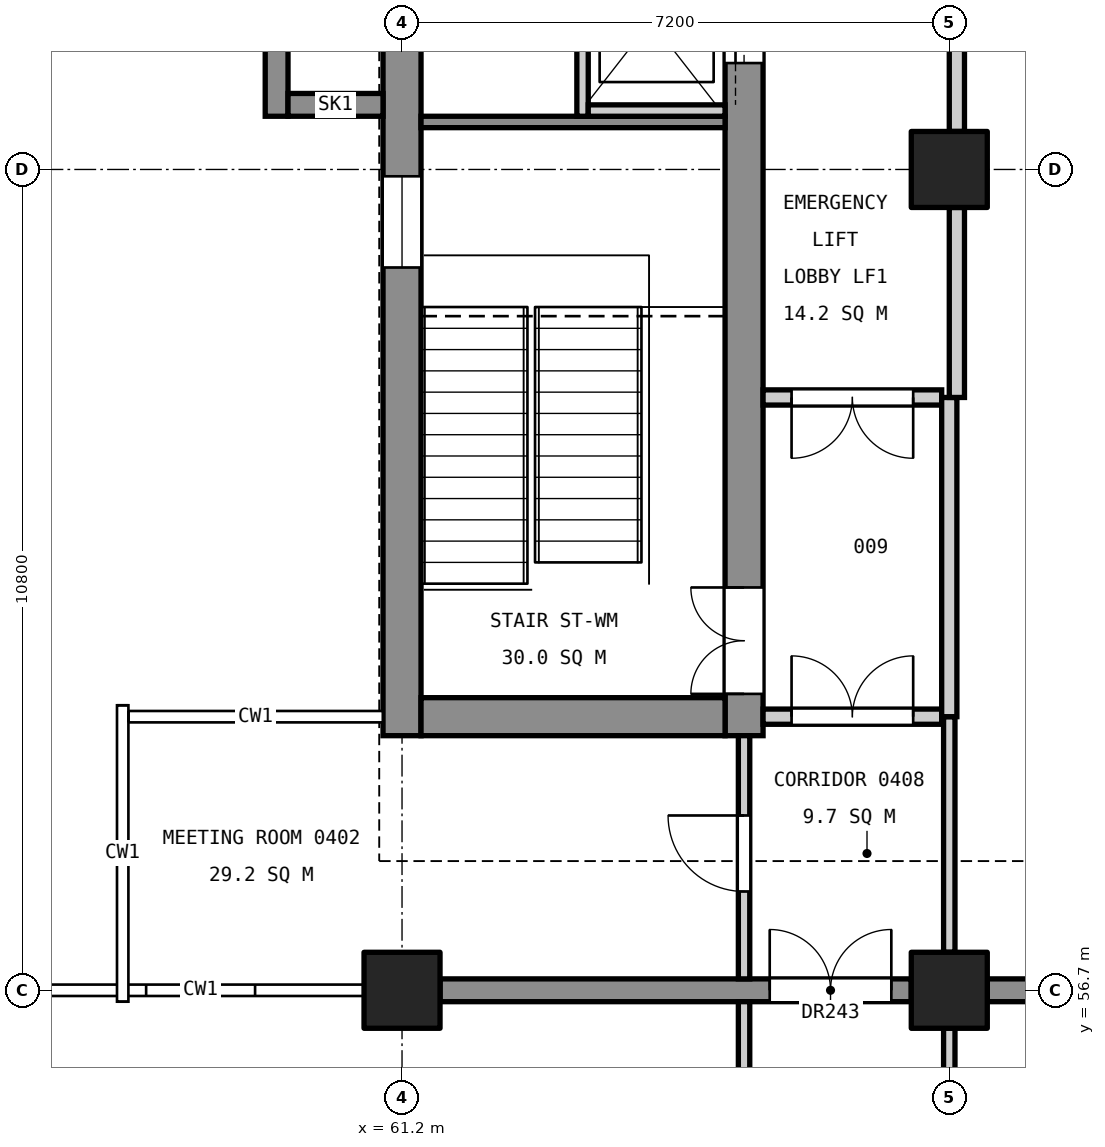
"""IFC4 building model, lengths in metres.
Left out: names, types, materials, properties, quantities, classifications, styles, units other than length and angle.
Written with IfcOpenShell. Run it as: python <this file> out.ifc"""

import sys

from ifc_helpers import new_model, si_unit, direction, frame, frame_2d, origin, origin_2d, place, context, subcontext, project, spatial, rectangle, extrude, element, fill, save


model = new_model("IFC4")
c1 = context("Model", 3, precision=1e-05, world=origin(), true_north=direction((0.0, 1.0)))
c2 = subcontext(c1, "Body", "Model", "MODEL_VIEW")
j1 = project(units=[si_unit("LENGTHUNIT", "METRE"), si_unit("PLANEANGLEUNIT", "RADIAN")], contexts=[c1])
p1 = place(None, origin())
s1 = spatial("IfcSite", under=j1, at=p1, CompositionType="ELEMENT")
p2 = place(p1, origin())
s2 = spatial("IfcBuilding", under=s1, at=p2, CompositionType="ELEMENT")
p3 = place(p2, frame((0.0, 0.0, 22.2)))
s3 = spatial("IfcBuildingStorey", under=s2, at=p3, CompositionType="ELEMENT", Elevation=22.2)
for number, where, z_axis, x_axis in (
    (1, (61.2, 56.7, 0.0), (0.0, 0.0, 1.0), (1.0, 0.0, 0.0)),
    (2, (68.4, 56.7, 0.0), (0.0, 0.0, 1.0), (1.0, 0.0, 0.0)),
    (3, (68.4, 67.5, 0.0), (0.0, 0.0, 1.0), (1.0, 0.0, 0.0)),
):
    element("IfcColumn", number, at=place(p3, frame(where, z_axis=z_axis, x_axis=x_axis)), inside=s3, PredefinedType="COLUMN", context=c2, shape_type="SweptSolid", body=[
        extrude(rectangle(XDim=1.0, YDim=1.0, at=origin_2d()), origin(), (0.0, 0.0, 1.0), 4.8),
    ])
p4 = place(p3, frame((61.2, 60.05, 0.0), z_axis=(0.0, 0.0, 1.0), x_axis=(0.0, 1.0, 0.0)))
e4 = element("IfcWall", 4, at=p4, inside=s3, PredefinedType="SHEAR", context=c2, shape_type="SweptSolid", body=[
    extrude(rectangle(XDim=14.9, YDim=0.5, at=frame_2d((7.45, 0.0))), origin(), (0.0, 0.0, 1.0), 4.55),
])
p5 = place(p4, frame((6.16, 0.0, 3.4)))
e5 = element("IfcOpeningElement", 5, at=p5, cuts=e4, PredefinedType="OPENING", context=c2, shape_type="SweptSolid", body=[
    extrude(rectangle(XDim=1.2, YDim=0.9, at=frame_2d((0.6, 0.45))), frame((0.0, 0.26, 0.0), z_axis=(0.0, -1.0, 0.0), x_axis=(1.0, 0.0, 0.0)), (0.0, 0.0, 1.0), 0.52),
])
p6 = place(p3, frame((65.7, 60.05, 0.0), z_axis=(0.0, 0.0, 1.0), x_axis=(0.0, 1.0, 0.0)))
e6 = element("IfcWall", 6, at=p6, inside=s3, PredefinedType="SHEAR", context=c2, shape_type="SweptSolid", body=[
    extrude(rectangle(XDim=14.9, YDim=0.5, at=frame_2d((7.45, 0.0))), origin(), (0.0, 0.0, 1.0), 4.55),
])
p7 = place(p6, frame((0.55, 0.0, 0.0)))
e7 = element("IfcOpeningElement", 7, at=p7, cuts=e6, PredefinedType="OPENING", context=c2, shape_type="SweptSolid", body=[
    extrude(rectangle(XDim=1.4, YDim=2.1, at=frame_2d((0.7, 1.05))), frame((0.0, 0.26, 0.0), z_axis=(0.0, -1.0, 0.0), x_axis=(1.0, 0.0, 0.0)), (0.0, 0.0, 1.0), 0.52),
])
p8 = place(p6, frame((8.85, 0.0, 0.0)))
e8 = element("IfcOpeningElement", 8, at=p8, cuts=e6, PredefinedType="OPENING", context=c2, shape_type="SweptSolid", body=[
    extrude(rectangle(XDim=1.1, YDim=2.1, at=frame_2d((0.55, 1.05))), frame((0.0, 0.26, 0.0), z_axis=(0.0, -1.0, 0.0), x_axis=(1.0, 0.0, 0.0)), (0.0, 0.0, 1.0), 0.52),
])
p9 = place(p6, frame((11.4, 0.0, 0.0)))
e9 = element("IfcOpeningElement", 9, at=p9, cuts=e6, PredefinedType="OPENING", context=c2, shape_type="SweptSolid", body=[
    extrude(rectangle(XDim=1.1, YDim=2.1, at=frame_2d((0.55, 1.05))), frame((0.0, 0.26, 0.0), z_axis=(0.0, -1.0, 0.0), x_axis=(1.0, 0.0, 0.0)), (0.0, 0.0, 1.0), 0.52),
])
p10 = place(p3, frame((61.45, 60.3, 0.0), z_axis=(0.0, 0.0, 1.0), x_axis=(1.0, 0.0, 0.0)))
e10 = element("IfcWall", 10, at=p10, inside=s3, PredefinedType="SHEAR", context=c2, shape_type="SweptSolid", body=[
    extrude(rectangle(XDim=4.0, YDim=0.5, at=frame_2d((2.0, 0.0))), origin(), (0.0, 0.0, 1.0), 4.55),
])
p11 = place(p3, frame((59.55, 68.2, 0.0), z_axis=(0.0, 0.0, 1.0), x_axis=(0.0, 1.0, 0.0)))
e11 = element("IfcWall", 11, at=p11, inside=s3, PredefinedType="SHEAR", context=c2, shape_type="SweptSolid", body=[
    extrude(rectangle(XDim=5.1, YDim=0.3, at=frame_2d((2.55, 0.0))), origin(), (0.0, 0.0, 1.0), 4.8),
])
p12 = place(p11, frame((1.65, 0.0, 3.0)))
e12 = element("IfcOpeningElement", 12, at=p12, cuts=e11, PredefinedType="OPENING", context=c2, shape_type="SweptSolid", body=[
    extrude(rectangle(XDim=1.8, YDim=1.2, at=frame_2d((0.9, 0.6))), frame((0.0, 0.16, 0.0), z_axis=(0.0, -1.0, 0.0), x_axis=(1.0, 0.0, 0.0)), (0.0, 0.0, 1.0), 0.32),
])
p13 = place(p3, frame((60.95, 68.35, 0.0), z_axis=(0.0, 0.0, 1.0), x_axis=(-1.0, 0.0, 0.0)))
e13 = element("IfcWall", 13, at=p13, inside=s3, PredefinedType="SHEAR", context=c2, shape_type="SweptSolid", body=[
    extrude(rectangle(XDim=1.25, YDim=0.3, at=frame_2d((0.625, 0.0))), origin(), (0.0, 0.0, 1.0), 4.8),
])
p14 = place(p3, frame((61.7, 56.7, 0.0), z_axis=(0.0, 0.0, 1.0), x_axis=(1.0, 0.0, 0.0)))
e14 = element("IfcWall", 14, at=p14, inside=s3, PredefinedType="SHEAR", context=c2, shape_type="SweptSolid", body=[
    extrude(rectangle(XDim=6.2, YDim=0.3, at=frame_2d((3.1, 0.0))), origin(), (0.0, 0.0, 1.0), 4.55),
])
p15 = place(p14, frame((4.337, 0.0, 0.0)))
e15 = element("IfcOpeningElement", 15, at=p15, cuts=e14, PredefinedType="OPENING", context=c2, shape_type="SweptSolid", body=[
    extrude(rectangle(XDim=1.6, YDim=2.1, at=frame_2d((0.8, 1.05))), frame((0.0, 0.16, 0.0), z_axis=(0.0, -1.0, 0.0), x_axis=(1.0, 0.0, 0.0)), (0.0, 0.0, 1.0), 0.32),
])
p16 = place(p3, frame((68.9, 56.7, 0.0), z_axis=(0.0, 0.0, 1.0), x_axis=(1.0, 0.0, 0.0)))
e16 = element("IfcWall", 16, at=p16, inside=s3, PredefinedType="SHEAR", context=c2, shape_type="SweptSolid", body=[
    extrude(rectangle(XDim=9.8, YDim=0.3, at=frame_2d((4.9, 0.0))), origin(), (0.0, 0.0, 1.0), 4.55),
])
p17 = place(p3, frame((61.45, 68.125, 0.0), z_axis=(0.0, 0.0, 1.0), x_axis=(1.0, 0.0, 0.0)))
e17 = element("IfcWall", 17, at=p17, inside=s3, PredefinedType="SOLIDWALL", context=c2, shape_type="SweptSolid", body=[
    extrude(rectangle(XDim=4.0, YDim=0.15, at=frame_2d((2.0, 0.0))), origin(), (0.0, 0.0, 1.0), 4.55),
])
p18 = place(p3, frame((63.575, 68.2, 0.0), z_axis=(0.0, 0.0, 1.0), x_axis=(0.0, 1.0, 0.0)))
e18 = element("IfcWall", 18, at=p18, inside=s3, PredefinedType="SOLIDWALL", context=c2, shape_type="SweptSolid", body=[
    extrude(rectangle(XDim=2.5, YDim=0.15, at=frame_2d((1.25, 0.0))), origin(), (0.0, 0.0, 1.0), 4.8),
])
p19 = place(p3, frame((63.65, 68.275, 0.0), z_axis=(0.0, 0.0, 1.0), x_axis=(1.0, 0.0, 0.0)))
e19 = element("IfcWall", 19, at=p19, inside=s3, PredefinedType="SOLIDWALL", context=c2, shape_type="SweptSolid", body=[
    extrude(rectangle(XDim=1.8, YDim=0.15, at=frame_2d((0.9, 0.0))), origin(), (0.0, 0.0, 1.0), 4.8),
])
p20 = place(p3, frame((65.7, 46.15, 0.0), z_axis=(0.0, 0.0, 1.0), x_axis=(0.0, 1.0, 0.0)))
e20 = element("IfcWall", 20, at=p20, inside=s3, PredefinedType="PARTITIONING", context=c2, shape_type="SweptSolid", body=[
    extrude(rectangle(XDim=10.4, YDim=0.15, at=frame_2d((5.2, 0.0))), origin(), (0.0, 0.0, 1.0), 3.55),
])
p21 = place(p20, frame((4.65, 0.0, 0.0)))
e21 = element("IfcOpeningElement", 21, at=p21, cuts=e20, PredefinedType="OPENING", context=c2, shape_type="SweptSolid", body=[
    extrude(rectangle(XDim=1.0, YDim=2.1, at=frame_2d((0.5, 1.05))), frame((0.0, 0.085, 0.0), z_axis=(0.0, -1.0, 0.0), x_axis=(1.0, 0.0, 0.0)), (0.0, 0.0, 1.0), 0.17),
])
p22 = place(p3, frame((65.7, 56.85, 0.0), z_axis=(0.0, 0.0, 1.0), x_axis=(0.0, 1.0, 0.0)))
e22 = element("IfcWall", 22, at=p22, inside=s3, PredefinedType="PARTITIONING", context=c2, shape_type="SweptSolid", body=[
    extrude(rectangle(XDim=3.2, YDim=0.15, at=frame_2d((1.6, 0.0))), origin(), (0.0, 0.0, 1.0), 3.55),
])
p23 = place(p22, frame((1.15, 0.0, 0.0)))
e23 = element("IfcOpeningElement", 23, at=p23, cuts=e22, PredefinedType="OPENING", context=c2, shape_type="SweptSolid", body=[
    extrude(rectangle(XDim=1.0, YDim=2.1, at=frame_2d((0.5, 1.05))), frame((0.0, 0.085, 0.0), z_axis=(0.0, -1.0, 0.0), x_axis=(1.0, 0.0, 0.0)), (0.0, 0.0, 1.0), 0.17),
])
p24 = place(p3, frame((65.95, 60.3, 0.0), z_axis=(0.0, 0.0, 1.0), x_axis=(1.0, 0.0, 0.0)))
e24 = element("IfcWall", 24, at=p24, inside=s3, PredefinedType="PARTITIONING", context=c2, shape_type="SweptSolid", body=[
    extrude(rectangle(XDim=2.35, YDim=0.2, at=frame_2d((1.175, 0.0))), origin(), (0.0, 0.0, 1.0), 3.85),
])
p25 = place(p24, frame((0.375, 0.0, 0.0)))
e25 = element("IfcOpeningElement", 25, at=p25, cuts=e24, PredefinedType="OPENING", context=c2, shape_type="SweptSolid", body=[
    extrude(rectangle(XDim=1.6, YDim=2.1, at=frame_2d((0.8, 1.05))), frame((0.0, 0.11, 0.0), z_axis=(0.0, -1.0, 0.0), x_axis=(1.0, 0.0, 0.0)), (0.0, 0.0, 1.0), 0.22),
])
p26 = place(p3, frame((65.95, 64.5, 0.0), z_axis=(0.0, 0.0, 1.0), x_axis=(1.0, 0.0, 0.0)))
e26 = element("IfcWall", 26, at=p26, inside=s3, PredefinedType="PARTITIONING", context=c2, shape_type="SweptSolid", body=[
    extrude(rectangle(XDim=2.35, YDim=0.2, at=frame_2d((1.175, 0.0))), origin(), (0.0, 0.0, 1.0), 3.55),
])
p27 = place(p26, frame((0.375, 0.0, 0.0)))
e27 = element("IfcOpeningElement", 27, at=p27, cuts=e26, PredefinedType="OPENING", context=c2, shape_type="SweptSolid", body=[
    extrude(rectangle(XDim=1.6, YDim=2.1, at=frame_2d((0.8, 1.05))), frame((0.0, 0.11, 0.0), z_axis=(0.0, -1.0, 0.0), x_axis=(1.0, 0.0, 0.0)), (0.0, 0.0, 1.0), 0.22),
])
p28 = place(p3, frame((68.4, 46.4, 0.0), z_axis=(0.0, 0.0, 1.0), x_axis=(0.0, 1.0, 0.0)))
e28 = element("IfcWall", 28, at=p28, inside=s3, PredefinedType="PARTITIONING", context=c2, shape_type="SweptSolid", body=[
    extrude(rectangle(XDim=9.8, YDim=0.15, at=frame_2d((4.9, 0.0))), origin(), (0.0, 0.0, 1.0), 3.55),
])
p29 = place(p28, frame((1.05, 0.0, 0.0)))
e29 = element("IfcOpeningElement", 29, at=p29, cuts=e28, PredefinedType="OPENING", context=c2, shape_type="SweptSolid", body=[
    extrude(rectangle(XDim=1.0, YDim=2.1, at=frame_2d((0.5, 1.05))), frame((0.0, 0.085, 0.0), z_axis=(0.0, -1.0, 0.0), x_axis=(1.0, 0.0, 0.0)), (0.0, 0.0, 1.0), 0.17),
])
p30 = place(p28, frame((5.85, 0.0, 0.0)))
e30 = element("IfcOpeningElement", 30, at=p30, cuts=e28, PredefinedType="OPENING", context=c2, shape_type="SweptSolid", body=[
    extrude(rectangle(XDim=1.2, YDim=2.1, at=frame_2d((0.6, 1.05))), frame((0.0, 0.085, 0.0), z_axis=(0.0, -1.0, 0.0), x_axis=(1.0, 0.0, 0.0)), (0.0, 0.0, 1.0), 0.17),
])
p31 = place(p3, frame((68.4, 57.2, 0.0), z_axis=(0.0, 0.0, 1.0), x_axis=(0.0, 1.0, 0.0)))
e31 = element("IfcWall", 31, at=p31, inside=s3, PredefinedType="PARTITIONING", context=c2, shape_type="SweptSolid", body=[
    extrude(rectangle(XDim=3.1, YDim=0.15, at=frame_2d((1.55, 0.0))), origin(), (0.0, 0.0, 1.0), 3.55),
])
p32 = place(p3, frame((68.4, 60.3, 0.0), z_axis=(0.0, 0.0, 1.0), x_axis=(0.0, 1.0, 0.0)))
e32 = element("IfcWall", 32, at=p32, inside=s3, PredefinedType="PARTITIONING", context=c2, shape_type="SweptSolid", body=[
    extrude(rectangle(XDim=4.2, YDim=0.2, at=frame_2d((2.1, 0.0))), origin(), (0.0, 0.0, 1.0), 3.55),
])
p33 = place(p3, frame((68.5, 64.5, 0.0), z_axis=(0.0, 0.0, 1.0), x_axis=(0.0, 1.0, 0.0)))
e33 = element("IfcWall", 33, at=p33, inside=s3, PredefinedType="PARTITIONING", context=c2, shape_type="SweptSolid", body=[
    extrude(rectangle(XDim=2.5, YDim=0.2, at=frame_2d((1.25, 0.0))), origin(), (0.0, 0.0, 1.0), 3.55),
])
p34 = place(p3, frame((68.5, 68.0, 0.0), z_axis=(0.0, 0.0, 1.0), x_axis=(0.0, 1.0, 0.0)))
e34 = element("IfcWall", 34, at=p34, inside=s3, PredefinedType="PARTITIONING", context=c2, shape_type="SweptSolid", body=[
    extrude(rectangle(XDim=2.8, YDim=0.2, at=frame_2d((1.4, 0.0))), origin(), (0.0, 0.0, 1.0), 3.55),
])
p35 = place(p7, origin())
e35 = element("IfcDoor", 35, at=p35, inside=s3, OperationType="DOUBLE_DOOR_SINGLE_SWING", PredefinedType="DOOR", context=c2, shape_type="SweptSolid", body=[
    extrude(rectangle(XDim=1.4, YDim=2.1, at=frame_2d((0.7, 1.05))), frame((0.0, 0.025, 0.0), z_axis=(0.0, -1.0, 0.0), x_axis=(1.0, 0.0, 0.0)), (0.0, 0.0, 1.0), 0.05),
])
fill(e7, e35)
p36 = place(p8, origin())
e36 = element("IfcDoor", 36, at=p36, inside=s3, OperationType="SLIDING_TO_LEFT", PredefinedType="DOOR", context=c2, shape_type="SweptSolid", body=[
    extrude(rectangle(XDim=1.1, YDim=2.1, at=frame_2d((0.55, 1.05))), frame((0.0, 0.025, 0.0), z_axis=(0.0, -1.0, 0.0), x_axis=(1.0, 0.0, 0.0)), (0.0, 0.0, 1.0), 0.05),
])
fill(e8, e36)
p37 = place(p5, origin())
e37 = element("IfcWindow", 37, at=p37, inside=s3, PartitioningType="SINGLE_PANEL", PredefinedType="WINDOW", context=c2, shape_type="SweptSolid", body=[
    extrude(rectangle(XDim=1.2, YDim=0.9, at=frame_2d((0.6, 0.45))), frame((0.0, 0.03, 0.0), z_axis=(0.0, -1.0, 0.0), x_axis=(1.0, 0.0, 0.0)), (0.0, 0.0, 1.0), 0.06),
])
fill(e5, e37)
p38 = place(p23, origin())
e38 = element("IfcDoor", 38, at=p38, inside=s3, OperationType="SINGLE_SWING_RIGHT", PredefinedType="DOOR", context=c2, shape_type="SweptSolid", body=[
    extrude(rectangle(XDim=1.0, YDim=2.1, at=frame_2d((0.5, 1.05))), frame((0.0, 0.025, 0.0), z_axis=(0.0, -1.0, 0.0), x_axis=(1.0, 0.0, 0.0)), (0.0, 0.0, 1.0), 0.05),
])
fill(e23, e38)
p39 = place(p25, origin())
e39 = element("IfcDoor", 39, at=p39, inside=s3, OperationType="DOUBLE_DOOR_SINGLE_SWING", PredefinedType="DOOR", context=c2, shape_type="SweptSolid", body=[
    extrude(rectangle(XDim=1.6, YDim=2.1, at=frame_2d((0.8, 1.05))), frame((0.0, 0.025, 0.0), z_axis=(0.0, -1.0, 0.0), x_axis=(1.0, 0.0, 0.0)), (0.0, 0.0, 1.0), 0.05),
])
fill(e25, e39)
p40 = place(p27, frame((1.6, 0.0, 0.0), z_axis=(0.0, 0.0, 1.0), x_axis=(-1.0, 0.0, 0.0)))
e40 = element("IfcDoor", 40, at=p40, inside=s3, OperationType="DOUBLE_DOOR_SINGLE_SWING", PredefinedType="DOOR", context=c2, shape_type="SweptSolid", body=[
    extrude(rectangle(XDim=1.6, YDim=2.1, at=frame_2d((0.8, 1.05))), frame((0.0, 0.025, 0.0), z_axis=(0.0, -1.0, 0.0), x_axis=(1.0, 0.0, 0.0)), (0.0, 0.0, 1.0), 0.05),
])
fill(e27, e40)
p41 = place(p15, origin())
e41 = element("IfcDoor", 41, at=p41, inside=s3, OperationType="DOUBLE_DOOR_SINGLE_SWING", PredefinedType="DOOR", context=c2, shape_type="SweptSolid", body=[
    extrude(rectangle(XDim=1.6, YDim=2.1, at=frame_2d((0.8, 1.05))), frame((0.0, 0.025, 0.0), z_axis=(0.0, -1.0, 0.0), x_axis=(1.0, 0.0, 0.0)), (0.0, 0.0, 1.0), 0.05),
])
fill(e15, e41)
save(model, sys.argv[1])
